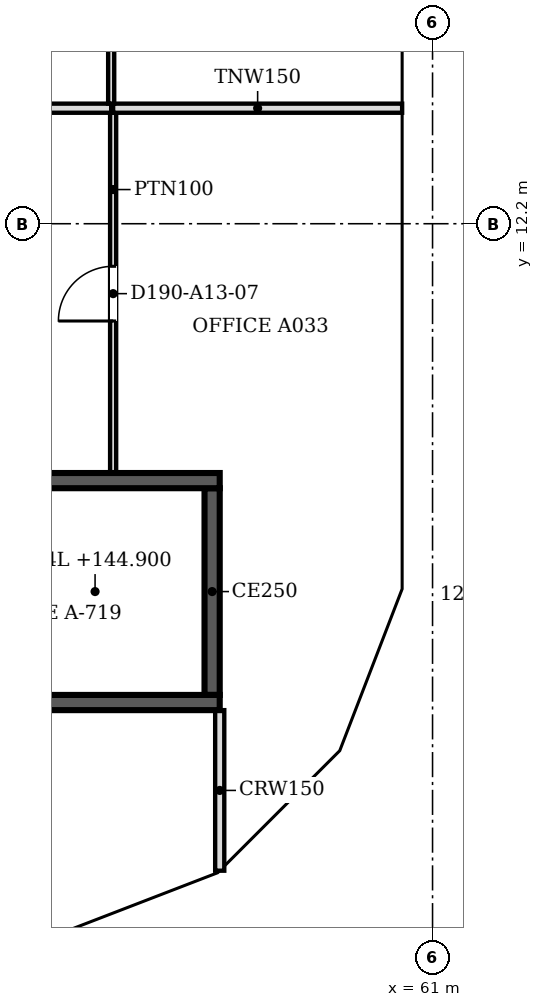
"""IFC4 building model, lengths in metres.
Left out: names, types, materials, properties, quantities, classifications, styles, units other than length and angle.
Written with IfcOpenShell. Run it as: python <this file> out.ifc"""

import sys

from ifc_helpers import new_model, si_unit, direction, frame, frame_2d, origin, place, context, subcontext, project, spatial, polyline, rectangle, outline, extrude, faceted_brep, source, transform, mapped, element, fill, save


model = new_model("IFC4")
c1 = context("Model", 3, precision=1e-05, world=origin(), true_north=direction((0.0, 1.0)))
c2 = subcontext(c1, "Body", "Model", "MODEL_VIEW")
j1 = project(units=[si_unit("LENGTHUNIT", "METRE"), si_unit("PLANEANGLEUNIT", "RADIAN")], contexts=[c1])
p1 = place(None, origin())
s1 = spatial("IfcSite", under=j1, at=p1, CompositionType="ELEMENT")
p2 = place(p1, origin())
s2 = spatial("IfcBuilding", under=s1, at=p2, CompositionType="ELEMENT")
p3 = place(p2, frame((0.0, 0.0, 143.0)))
s3 = spatial("IfcBuildingStorey", under=s2, at=p3, CompositionType="ELEMENT", Elevation=143.0)
m1 = source(origin(), c2, "Body", "Brep", [
    faceted_brep([(0.047, -0.25, 0.0), (2.997, -0.25, 3.8), (0.047, -0.25, 7.6), (0.0, -0.25, 7.541), (0.0, -0.25, 0.059), (0.093, 0.25, 7.54), (2.944, 0.25, 3.868), (2.944, 0.25, 3.732), (0.093, 0.25, 0.06), (2.997, 0.0, 3.8), (0.047, 0.0, 0.0), (0.047, 0.0, 7.6)], [[[0, 1, 2, 3, 4]], [[5, 6, 7, 8]], [[8, 7, 9, 1, 0, 10]], [[6, 5, 11, 2, 1, 9]], [[3, 2, 11]], [[10, 0, 4]], [[8, 10, 4, 3, 11, 5]], [[9, 7, 6]]]),
])
p4 = place(p3, frame((54.81, 0.233, -3.8), z_axis=(0.0, 0.0, 1.0), x_axis=(0.932990326376, 0.359901446078, 0.0)))
e1 = element("IfcWall", 1, at=p4, inside=s3, PredefinedType="SOLIDWALL", context=c2, shape_type="MappedRepresentation", body=[
    mapped(m1, transform((0.0, 0.0, 0.0), scale=1.0)),
])
m2 = source(origin(), c2, "Body", "SweptSolid", [
    extrude(outline(polyline([(0.247, 0.665), (2.681, 3.8), (0.247, 6.935), (0.247, 0.665)])), frame((0.0, 0.26, 0.0), z_axis=(0.0, -1.0, 0.0), x_axis=(1.0, 0.0, 0.0)), (0.0, 0.0, 1.0), 0.52),
])
p5 = place(p4, origin())
e2 = element("IfcOpeningElement", 2, at=p5, cuts=e1, PredefinedType="OPENING", context=c2, shape_type="MappedRepresentation", body=[
    mapped(m2, transform((0.0, 0.0, 0.0), scale=1.0)),
])
m3 = source(origin(), c2, "Body", "Brep", [
    faceted_brep([(2.944, -0.25, 0.0), (2.997, -0.25, 0.068), (2.997, -0.25, 7.532), (2.944, -0.25, 7.6), (0.0, -0.25, 3.8), (0.053, 0.25, 3.868), (2.891, 0.25, 7.532), (2.891, 0.25, 0.068), (0.053, 0.25, 3.732), (2.944, 0.0, 0.0), (2.944, 0.0, 7.6), (0.0, 0.0, 3.8)], [[[0, 1, 2, 3, 4]], [[5, 6, 7, 8]], [[1, 0, 9]], [[10, 3, 2]], [[6, 5, 11, 4, 3, 10]], [[8, 7, 9, 0, 4, 11]], [[8, 11, 5]], [[1, 9, 7, 6, 10, 2]]]),
])
p6 = place(p3, frame((57.606, 1.312, -3.8), z_axis=(0.0, 0.0, 1.0), x_axis=(0.707147509625, 0.707066050402, 0.0)))
e3 = element("IfcWall", 3, at=p6, inside=s3, PredefinedType="SOLIDWALL", context=c2, shape_type="MappedRepresentation", body=[
    mapped(m3, transform((0.0, 0.0, 0.0), scale=1.0)),
])
m4 = source(origin(), c2, "Body", "SweptSolid", [
    extrude(outline(polyline([(2.744, 6.934), (0.316, 3.8), (2.744, 0.666), (2.744, 6.934)])), frame((0.0, 0.26, 0.0), z_axis=(0.0, -1.0, 0.0), x_axis=(1.0, 0.0, 0.0)), (0.0, 0.0, 1.0), 0.52),
])
p7 = place(p6, origin())
e4 = element("IfcOpeningElement", 4, at=p7, cuts=e3, PredefinedType="OPENING", context=c2, shape_type="MappedRepresentation", body=[
    mapped(m4, transform((0.0, 0.0, 0.0), scale=1.0)),
])
m5 = source(origin(), c2, "Body", "Brep", [
    faceted_brep([(0.053, -0.25, 0.0), (3.003, -0.25, 3.8), (0.053, -0.25, 7.6), (0.0, -0.25, 7.532), (0.0, -0.25, 0.068), (0.106, 0.25, 7.532), (2.957, 0.25, 3.86), (2.957, 0.25, 3.74), (0.106, 0.25, 0.068), (3.003, 0.0, 3.8), (0.053, 0.0, 0.0), (0.053, 0.0, 7.6)], [[[0, 1, 2, 3, 4]], [[5, 6, 7, 8]], [[8, 7, 9, 1, 0, 10]], [[6, 5, 11, 2, 1, 9]], [[3, 2, 11]], [[10, 0, 4]], [[8, 10, 4, 3, 11, 5]], [[9, 7, 6]]]),
])
p8 = place(p3, frame((59.669, 3.344, -3.8), z_axis=(0.0, 0.0, 1.0), x_axis=(0.35992665181, 0.932980602862, 0.0)))
e5 = element("IfcWall", 5, at=p8, inside=s3, PredefinedType="SOLIDWALL", context=c2, shape_type="MappedRepresentation", body=[
    mapped(m5, transform((0.0, 0.0, 0.0), scale=1.0)),
])
m6 = source(origin(), c2, "Body", "SweptSolid", [
    extrude(outline(polyline([(0.253, 0.665), (2.687, 3.8), (0.253, 6.935), (0.253, 0.665)])), frame((0.0, 0.26, 0.0), z_axis=(0.0, -1.0, 0.0), x_axis=(1.0, 0.0, 0.0)), (0.0, 0.0, 1.0), 0.52),
])
p9 = place(p8, origin())
e6 = element("IfcOpeningElement", 6, at=p9, cuts=e5, PredefinedType="OPENING", context=c2, shape_type="MappedRepresentation", body=[
    mapped(m6, transform((0.0, 0.0, 0.0), scale=1.0)),
])
m7 = source(origin(), c2, "Body", "Brep", [
    faceted_brep([(3.003, -0.25, 0.0), (6.053, -0.25, 3.8), (3.003, -0.25, 7.6), (0.0, -0.25, 3.8), (0.047, 0.25, 3.859), (3.003, 0.25, 7.6), (6.053, 0.25, 3.8), (3.003, 0.25, 0.0), (0.047, 0.25, 3.741), (0.0, 0.0, 3.8)], [[[0, 1, 2, 3]], [[4, 5, 6, 7, 8]], [[7, 6, 1, 0]], [[6, 5, 2, 1]], [[5, 4, 9, 3, 2]], [[8, 7, 0, 3, 9]], [[8, 9, 4]]]),
])
p10 = place(p3, frame((60.75, 6.146, -3.8), z_axis=(0.0, 0.0, 1.0), x_axis=(0.0, 1.0, 0.0)))
e7 = element("IfcWall", 7, at=p10, inside=s3, PredefinedType="SOLIDWALL", context=c2, shape_type="MappedRepresentation", body=[
    mapped(m7, transform((0.0, 0.0, 0.0), scale=1.0)),
])
m8 = source(origin(), c2, "Body", "SweptSolid", [
    extrude(outline(polyline([(3.005, 0.401), (5.733, 3.8), (3.005, 7.199), (0.319, 3.8), (3.005, 0.401)])), frame((0.0, 0.26, 0.0), z_axis=(0.0, -1.0, 0.0), x_axis=(1.0, 0.0, 0.0)), (0.0, 0.0, 1.0), 0.52),
])
p11 = place(p10, origin())
e8 = element("IfcOpeningElement", 8, at=p11, cuts=e7, PredefinedType="OPENING", context=c2, shape_type="MappedRepresentation", body=[
    mapped(m8, transform((0.0, 0.0, 0.0), scale=1.0)),
])
m9 = source(origin(), c2, "Body", "SweptSolid", [
    extrude(outline(polyline([(3.05, 0.0), (6.1, 3.8), (3.05, 7.6), (0.0, 3.8), (3.05, 0.0)])), frame((0.0, 0.25, 0.0), z_axis=(0.0, -1.0, 0.0), x_axis=(1.0, 0.0, 0.0)), (0.0, 0.0, 1.0), 0.5),
])
p12 = place(p3, frame((60.75, 12.2, -3.8), z_axis=(0.0, 0.0, 1.0), x_axis=(0.0, 1.0, 0.0)))
e9 = element("IfcWall", 9, at=p12, inside=s3, PredefinedType="SOLIDWALL", context=c2, shape_type="MappedRepresentation", body=[
    mapped(m9, transform((0.0, 0.0, 0.0), scale=1.0)),
])
m10 = source(origin(), c2, "Body", "SweptSolid", [
    extrude(outline(polyline([(3.05, 0.399), (5.78, 3.8), (3.05, 7.201), (0.321, 3.8), (3.05, 0.399)])), frame((0.0, 0.26, 0.0), z_axis=(0.0, -1.0, 0.0), x_axis=(1.0, 0.0, 0.0)), (0.0, 0.0, 1.0), 0.52),
])
p13 = place(p12, origin())
e10 = element("IfcOpeningElement", 10, at=p13, cuts=e9, PredefinedType="OPENING", context=c2, shape_type="MappedRepresentation", body=[
    mapped(m10, transform((0.0, 0.0, 0.0), scale=1.0)),
])
p14 = place(p2, frame((0.0, 0.0, 146.8)))
s4 = spatial("IfcBuildingStorey", under=s2, at=p14, CompositionType="ELEMENT", Elevation=146.8)
m11 = source(origin(), c2, "Body", "Brep", [
    faceted_brep([(2.95, -0.25, 0.0), (3.003, -0.25, 0.068), (3.003, -0.25, 7.532), (2.95, -0.25, 7.6), (0.0, -0.25, 3.8), (0.047, 0.25, 3.86), (2.898, 0.25, 7.532), (2.898, 0.25, 0.068), (0.047, 0.25, 3.74), (2.95, 0.0, 0.0), (2.95, 0.0, 7.6), (0.0, 0.0, 3.8)], [[[0, 1, 2, 3, 4]], [[5, 6, 7, 8]], [[1, 0, 9]], [[10, 3, 2]], [[6, 5, 11, 4, 3, 10]], [[8, 7, 9, 0, 4, 11]], [[8, 11, 5]], [[1, 9, 7, 6, 10, 2]]]),
])
p15 = place(p14, frame((54.854, 0.25, -3.8), z_axis=(0.0, 0.0, 1.0), x_axis=(0.932970071518, 0.359953949349, 0.0)))
e11 = element("IfcWall", 11, at=p15, inside=s4, PredefinedType="SOLIDWALL", context=c2, shape_type="MappedRepresentation", body=[
    mapped(m11, transform((0.0, 0.0, 0.0), scale=1.0)),
])
m12 = source(origin(), c2, "Body", "SweptSolid", [
    extrude(outline(polyline([(2.75, 6.935), (0.316, 3.8), (2.75, 0.665), (2.75, 6.935)])), frame((0.0, 0.26, 0.0), z_axis=(0.0, -1.0, 0.0), x_axis=(1.0, 0.0, 0.0)), (0.0, 0.0, 1.0), 0.52),
])
p16 = place(p15, origin())
e12 = element("IfcOpeningElement", 12, at=p16, cuts=e11, PredefinedType="OPENING", context=c2, shape_type="MappedRepresentation", body=[
    mapped(m12, transform((0.0, 0.0, 0.0), scale=1.0)),
])
m13 = source(origin(), c2, "Body", "Brep", [
    faceted_brep([(0.053, -0.25, 0.0), (2.997, -0.25, 3.8), (0.053, -0.25, 7.6), (0.0, -0.25, 7.532), (0.0, -0.25, 0.068), (0.106, 0.25, 7.532), (2.944, 0.25, 3.868), (2.944, 0.25, 3.732), (0.106, 0.25, 0.068), (2.997, 0.0, 3.8), (0.053, 0.0, 0.0), (0.053, 0.0, 7.6)], [[[0, 1, 2, 3, 4]], [[5, 6, 7, 8]], [[8, 7, 9, 1, 0, 10]], [[6, 5, 11, 2, 1, 9]], [[3, 2, 11]], [[10, 0, 4]], [[8, 10, 4, 3, 11, 5]], [[9, 7, 6]]]),
])
p17 = place(p14, frame((57.569, 1.274, -3.8), z_axis=(0.0, 0.0, 1.0), x_axis=(0.707066050402, 0.707147509625, 0.0)))
e13 = element("IfcWall", 13, at=p17, inside=s4, PredefinedType="SOLIDWALL", context=c2, shape_type="MappedRepresentation", body=[
    mapped(m13, transform((0.0, 0.0, 0.0), scale=1.0)),
])
m14 = source(origin(), c2, "Body", "SweptSolid", [
    extrude(outline(polyline([(0.253, 0.666), (2.681, 3.8), (0.253, 6.934), (0.253, 0.666)])), frame((0.0, 0.26, 0.0), z_axis=(0.0, -1.0, 0.0), x_axis=(1.0, 0.0, 0.0)), (0.0, 0.0, 1.0), 0.52),
])
p18 = place(p17, origin())
e14 = element("IfcOpeningElement", 14, at=p18, cuts=e13, PredefinedType="OPENING", context=c2, shape_type="MappedRepresentation", body=[
    mapped(m14, transform((0.0, 0.0, 0.0), scale=1.0)),
])
m15 = source(origin(), c2, "Body", "Brep", [
    faceted_brep([(2.95, -0.25, 0.0), (2.997, -0.25, 0.059), (2.997, -0.25, 7.541), (2.95, -0.25, 7.6), (0.0, -0.25, 3.8), (0.053, 0.25, 3.868), (2.904, 0.25, 7.54), (2.904, 0.25, 0.06), (0.053, 0.25, 3.732), (2.95, 0.0, 0.0), (2.95, 0.0, 7.6), (0.0, 0.0, 3.8)], [[[0, 1, 2, 3, 4]], [[5, 6, 7, 8]], [[1, 0, 9]], [[10, 3, 2]], [[6, 5, 11, 4, 3, 10]], [[8, 7, 9, 0, 4, 11]], [[8, 11, 5]], [[1, 9, 7, 6, 10, 2]]]),
])
p19 = place(p14, frame((59.688, 3.394, -3.8), z_axis=(0.0, 0.0, 1.0), x_axis=(0.359972353723, 0.932962970624, 0.0)))
e15 = element("IfcWall", 15, at=p19, inside=s4, PredefinedType="SOLIDWALL", context=c2, shape_type="MappedRepresentation", body=[
    mapped(m15, transform((0.0, 0.0, 0.0), scale=1.0)),
])
p20 = place(p19, origin())
e16 = element("IfcOpeningElement", 16, at=p20, cuts=e15, PredefinedType="OPENING", context=c2, shape_type="MappedRepresentation", body=[
    mapped(m12, transform((0.0, 0.0, 0.0), scale=1.0)),
])
m16 = source(origin(), c2, "Body", "Brep", [
    faceted_brep([(0.047, -0.25, 0.0), (3.05, -0.25, 3.8), (0.047, -0.25, 7.6), (0.0, -0.25, 7.54), (0.0, -0.25, 0.06), (0.093, 0.25, 7.541), (3.05, 0.25, 3.8), (0.093, 0.25, 0.059), (0.047, 0.0, 0.0), (0.047, 0.0, 7.6)], [[[0, 1, 2, 3, 4]], [[5, 6, 7]], [[7, 6, 1, 0, 8]], [[6, 5, 9, 2, 1]], [[3, 2, 9]], [[8, 0, 4]], [[7, 8, 4, 3, 9, 5]]]),
])
p21 = place(p14, frame((60.75, 6.1, -3.8), z_axis=(0.0, 0.0, 1.0), x_axis=(0.0, 1.0, 0.0)))
e17 = element("IfcWall", 17, at=p21, inside=s4, PredefinedType="SOLIDWALL", context=c2, shape_type="MappedRepresentation", body=[
    mapped(m16, transform((0.0, 0.0, 0.0), scale=1.0)),
])
m17 = source(origin(), c2, "Body", "SweptSolid", [
    extrude(outline(polyline([(0.247, 0.656), (2.731, 3.8), (0.247, 6.944), (0.247, 0.656)])), frame((0.0, 0.26, 0.0), z_axis=(0.0, -1.0, 0.0), x_axis=(1.0, 0.0, 0.0)), (0.0, 0.0, 1.0), 0.52),
])
p22 = place(p21, origin())
e18 = element("IfcOpeningElement", 18, at=p22, cuts=e17, PredefinedType="OPENING", context=c2, shape_type="MappedRepresentation", body=[
    mapped(m17, transform((0.0, 0.0, 0.0), scale=1.0)),
])
p23 = place(p14, frame((60.75, 9.15, -3.8), z_axis=(0.0, 0.0, 1.0), x_axis=(0.0, 1.0, 0.0)))
e19 = element("IfcWall", 19, at=p23, inside=s4, PredefinedType="SOLIDWALL", context=c2, shape_type="MappedRepresentation", body=[
    mapped(m9, transform((0.0, 0.0, 0.0), scale=1.0)),
])
p24 = place(p23, origin())
e20 = element("IfcOpeningElement", 20, at=p24, cuts=e19, PredefinedType="OPENING", context=c2, shape_type="MappedRepresentation", body=[
    mapped(m10, transform((0.0, 0.0, 0.0), scale=1.0)),
])
p25 = place(p3, frame((57.5, 4.325, 0.0), z_axis=(0.0, 0.0, 1.0), x_axis=(-1.0, 0.0, 0.0)))
e21 = element("IfcWall", 21, at=p25, inside=s3, PredefinedType="SOLIDWALL", context=c2, shape_type="SweptSolid", body=[
    extrude(rectangle(XDim=8.5, YDim=0.25, at=frame_2d((4.25, 0.0))), origin(), (0.0, 0.0, 1.0), 3.8),
])
m18 = source(origin(), c2, "Body", "SweptSolid", [
    extrude(rectangle(XDim=1.2, YDim=2.1, at=frame_2d((0.6, 1.05))), frame((0.0, 0.135, 0.0), z_axis=(0.0, -1.0, 0.0), x_axis=(1.0, 0.0, 0.0)), (0.0, 0.0, 1.0), 0.27),
])
p26 = place(p25, frame((6.9, 0.0, 0.0)))
e22 = element("IfcOpeningElement", 22, at=p26, cuts=e21, PredefinedType="OPENING", context=c2, shape_type="MappedRepresentation", body=[
    mapped(m18, transform((0.0, 0.0, 0.0), scale=1.0)),
])
p27 = place(p3, frame((49.0, 7.975, 0.0), z_axis=(0.0, 0.0, 1.0), x_axis=(1.0, 0.0, 0.0)))
e23 = element("IfcWall", 23, at=p27, inside=s3, PredefinedType="SOLIDWALL", context=c2, shape_type="SweptSolid", body=[
    extrude(rectangle(XDim=8.5, YDim=0.25, at=frame_2d((4.25, 0.0))), origin(), (0.0, 0.0, 1.0), 3.8),
])
p28 = place(p3, frame((57.375, 7.85, 0.0), z_axis=(0.0, 0.0, 1.0), x_axis=(0.0, -1.0, 0.0)))
e24 = element("IfcWall", 24, at=p28, inside=s3, PredefinedType="SOLIDWALL", context=c2, shape_type="SweptSolid", body=[
    extrude(rectangle(XDim=3.4, YDim=0.25, at=frame_2d((1.7, 0.0))), origin(), (0.0, 0.0, 1.0), 3.8),
])
p29 = place(p3, frame((57.5, 1.559, 0.0), z_axis=(0.0, 0.0, 1.0), x_axis=(0.0, 1.0, 0.0)))
e25 = element("IfcWall", 25, at=p29, inside=s3, PredefinedType="PARTITIONING", context=c2, shape_type="SweptSolid", body=[
    extrude(rectangle(XDim=2.641, YDim=0.15, at=frame_2d((1.32, 0.0))), origin(), (0.0, 0.0, 1.0), 3.067),
])
p30 = place(p3, frame((55.747, 14.024, 0.0), z_axis=(0.0, 0.0, 1.0), x_axis=(0.0, -1.0, 0.0)))
e26 = element("IfcWall", 26, at=p30, inside=s3, PredefinedType="PARTITIONING", context=c2, shape_type="SweptSolid", body=[
    extrude(rectangle(XDim=5.924, YDim=0.1, at=frame_2d((2.962, 0.0))), origin(), (0.0, 0.0, 1.0), 3.067),
])
m19 = source(origin(), c2, "Body", "SweptSolid", [
    extrude(rectangle(XDim=0.9, YDim=2.1, at=frame_2d((0.45, 1.05))), frame((0.0, 0.06, 0.0), z_axis=(0.0, -1.0, 0.0), x_axis=(1.0, 0.0, 0.0)), (0.0, 0.0, 1.0), 0.12),
])
p31 = place(p30, frame((2.524, 0.0, 0.0)))
e27 = element("IfcOpeningElement", 27, at=p31, cuts=e26, PredefinedType="OPENING", context=c2, shape_type="MappedRepresentation", body=[
    mapped(m19, transform((0.0, 0.0, 0.0), scale=1.0)),
])
p32 = place(p3, frame((46.476, 14.1, 0.0), z_axis=(0.0, 0.0, 1.0), x_axis=(1.0, 0.0, 0.0)))
e28 = element("IfcWall", 28, at=p32, inside=s3, PredefinedType="PARTITIONING", context=c2, shape_type="SweptSolid", body=[
    extrude(rectangle(XDim=9.239, YDim=0.15, at=frame_2d((4.62, 0.0))), origin(), (0.0, 0.0, 1.0), 3.067),
])
p33 = place(p3, frame((55.747, 14.1, 0.0), z_axis=(0.0, 0.0, 1.0), x_axis=(1.0, 0.0, 0.0)))
e29 = element("IfcWall", 29, at=p33, inside=s3, PredefinedType="PARTITIONING", context=c2, shape_type="SweptSolid", body=[
    extrude(rectangle(XDim=4.753, YDim=0.15, at=frame_2d((2.376, 0.0))), origin(), (0.0, 0.0, 1.0), 3.067),
])
p34 = place(p3, frame((55.715, 21.924, 0.0), z_axis=(0.0, 0.0, 1.0), x_axis=(0.0, -1.0, 0.0)))
e30 = element("IfcWall", 30, at=p34, inside=s3, PredefinedType="PARTITIONING", context=c2, shape_type="SweptSolid", body=[
    extrude(rectangle(XDim=7.748, YDim=0.1, at=frame_2d((3.874, 0.0))), origin(), (0.0, 0.0, 1.0), 3.067),
])
p35 = place(p34, frame((3.448, 0.0, 0.0)))
e31 = element("IfcOpeningElement", 31, at=p35, cuts=e30, PredefinedType="OPENING", context=c2, shape_type="MappedRepresentation", body=[
    mapped(m19, transform((0.0, 0.0, 0.0), scale=1.0)),
])
m20 = source(origin(), c2, "Body", "SweptSolid", [
    extrude(rectangle(XDim=0.9, YDim=2.1, at=frame_2d((0.45, 1.05))), frame((0.0, 0.025, 0.0), z_axis=(0.0, -1.0, 0.0), x_axis=(1.0, 0.0, 0.0)), (0.0, 0.0, 1.0), 0.05),
])
p36 = place(p31, origin())
e32 = element("IfcDoor", 32, at=p36, inside=s3, OperationType="SINGLE_SWING_RIGHT", PredefinedType="DOOR", context=c2, shape_type="MappedRepresentation", body=[
    mapped(m20, transform((0.0, 0.0, 0.0), scale=1.0)),
])
fill(e27, e32)
save(model, sys.argv[1])
